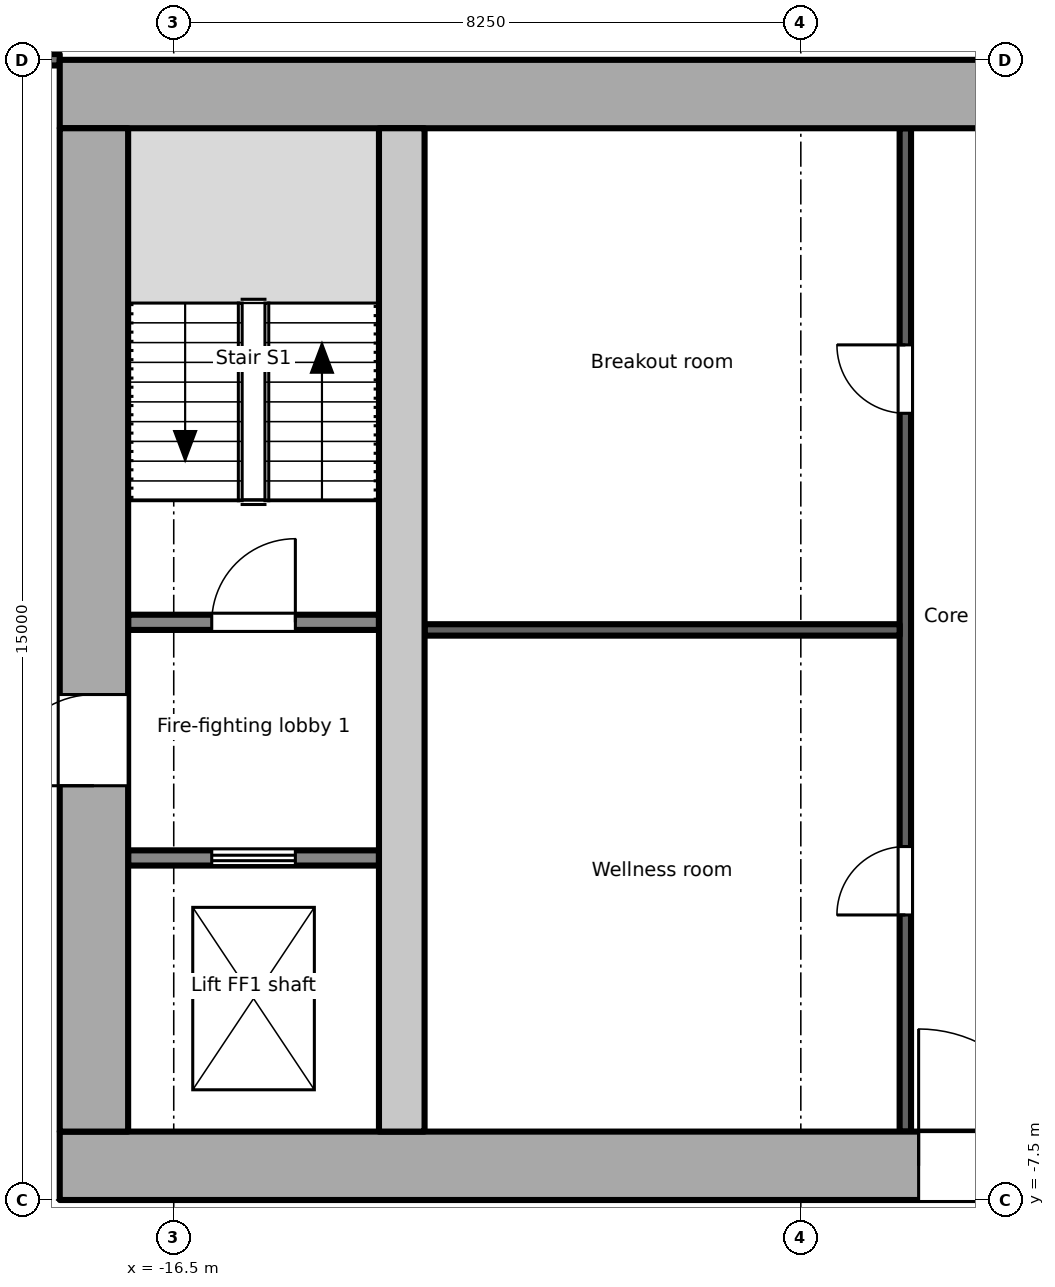
"""IFC4 building model, lengths in metres.
Left out: names, types, materials, properties, quantities, classifications, styles, units other than length and angle.
Written with IfcOpenShell. Run it as: python <this file> out.ifc"""

import sys

from ifc_helpers import new_model, si_unit, direction, frame, frame_2d, origin, place, context, subcontext, project, spatial, rectangle, extrude, element, fill, save


model = new_model("IFC4")
c1 = context("Model", 3, precision=1e-05, world=origin(), true_north=direction((0.0, 1.0)))
c2 = subcontext(c1, "Body", "Model", "MODEL_VIEW")
j1 = project(units=[si_unit("LENGTHUNIT", "METRE"), si_unit("PLANEANGLEUNIT", "RADIAN")], contexts=[c1])
p1 = place(None, origin())
s1 = spatial("IfcSite", under=j1, at=p1, CompositionType="ELEMENT")
p2 = place(p1, origin())
s2 = spatial("IfcBuilding", under=s1, at=p2, CompositionType="ELEMENT")
p3 = place(p2, frame((0.0, 0.0, 266.8)))
s3 = spatial("IfcBuildingStorey", under=s2, at=p3, CompositionType="ELEMENT", Elevation=266.8)
p4 = place(p3, frame((-18.0, -7.05, -0.2), z_axis=(0.0, 0.0, 1.0), x_axis=(1.0, 0.0, 0.0)))
e1 = element("IfcWall", 1, at=p4, inside=s3, PredefinedType="SHEAR", context=c2, shape_type="SweptSolid", body=[
    extrude(rectangle(XDim=36.0, YDim=0.9, at=frame_2d((18.0, 0.0))), origin(), (0.0, 0.0, 1.0), 3.9),
])
p5 = place(p4, frame((11.3, 0.0, 0.2)))
e2 = element("IfcOpeningElement", 2, at=p5, cuts=e1, PredefinedType="OPENING", context=c2, shape_type="SweptSolid", body=[
    extrude(rectangle(XDim=1.8, YDim=2.1, at=frame_2d((0.9, 1.05))), frame((0.0, 0.46, 0.0), z_axis=(0.0, -1.0, 0.0), x_axis=(1.0, 0.0, 0.0)), (0.0, 0.0, 1.0), 0.921),
])
p6 = place(p4, frame((16.8, 0.0, 0.2)))
e3 = element("IfcOpeningElement", 3, at=p6, cuts=e1, PredefinedType="OPENING", context=c2, shape_type="SweptSolid", body=[
    extrude(rectangle(XDim=2.4, YDim=2.1, at=frame_2d((1.2, 1.05))), frame((0.0, 0.46, 0.0), z_axis=(0.0, -1.0, 0.0), x_axis=(1.0, 0.0, 0.0)), (0.0, 0.0, 1.0), 0.921),
])
p7 = place(p4, frame((26.1, 0.0, 0.2)))
e4 = element("IfcOpeningElement", 4, at=p7, cuts=e1, PredefinedType="OPENING", context=c2, shape_type="SweptSolid", body=[
    extrude(rectangle(XDim=2.4, YDim=2.1, at=frame_2d((1.2, 1.05))), frame((0.0, 0.46, 0.0), z_axis=(0.0, -1.0, 0.0), x_axis=(1.0, 0.0, 0.0)), (0.0, 0.0, 1.0), 0.921),
])
p8 = place(p3, frame((-18.0, 7.05, -0.2), z_axis=(0.0, 0.0, 1.0), x_axis=(1.0, 0.0, 0.0)))
e5 = element("IfcWall", 5, at=p8, inside=s3, PredefinedType="SHEAR", context=c2, shape_type="SweptSolid", body=[
    extrude(rectangle(XDim=36.0, YDim=0.9, at=frame_2d((18.0, 0.0))), origin(), (0.0, 0.0, 1.0), 3.9),
])
p9 = place(p3, frame((-17.55, -6.6, -0.2), z_axis=(0.0, 0.0, 1.0), x_axis=(0.0, 1.0, 0.0)))
e6 = element("IfcWall", 6, at=p9, inside=s3, PredefinedType="SHEAR", context=c2, shape_type="SweptSolid", body=[
    extrude(rectangle(XDim=13.2, YDim=0.9, at=frame_2d((6.6, 0.0))), origin(), (0.0, 0.0, 1.0), 3.9),
])
p10 = place(p9, frame((4.55, 0.0, 0.2)))
e7 = element("IfcOpeningElement", 7, at=p10, cuts=e6, PredefinedType="OPENING", context=c2, shape_type="SweptSolid", body=[
    extrude(rectangle(XDim=1.2, YDim=2.1, at=frame_2d((0.6, 1.05))), frame((0.0, 0.46, 0.0), z_axis=(0.0, -1.0, 0.0), x_axis=(1.0, 0.0, 0.0)), (0.0, 0.0, 1.0), 0.921),
])
p11 = place(p3, frame((-13.5, -6.6, -0.2), z_axis=(0.0, 0.0, 1.0), x_axis=(0.0, 1.0, 0.0)))
e8 = element("IfcWall", 8, at=p11, inside=s3, PredefinedType="SHEAR", context=c2, shape_type="SweptSolid", body=[
    extrude(rectangle(XDim=13.2, YDim=0.6, at=frame_2d((6.6, 0.0))), origin(), (0.0, 0.0, 1.0), 3.9),
])
p12 = place(p3, frame((-17.1, -3.0, 0.0), z_axis=(0.0, 0.0, 1.0), x_axis=(1.0, 0.0, 0.0)))
e9 = element("IfcWall", 9, at=p12, inside=s3, PredefinedType="PARTITIONING", context=c2, shape_type="SweptSolid", body=[
    extrude(rectangle(XDim=3.3, YDim=0.2, at=frame_2d((1.65, 0.0))), origin(), (0.0, 0.0, 1.0), 3.7),
])
p13 = place(p12, frame((1.1, 0.0, 0.0)))
e10 = element("IfcOpeningElement", 10, at=p13, cuts=e9, PredefinedType="OPENING", context=c2, shape_type="SweptSolid", body=[
    extrude(rectangle(XDim=1.1, YDim=2.1, at=frame_2d((0.55, 1.05))), frame((0.0, 0.111, 0.0), z_axis=(0.0, -1.0, 0.0), x_axis=(1.0, 0.0, 0.0)), (0.0, 0.0, 1.0), 0.221),
])
p14 = place(p3, frame((-17.1, 0.1, 0.0), z_axis=(0.0, 0.0, 1.0), x_axis=(1.0, 0.0, 0.0)))
e11 = element("IfcWall", 11, at=p14, inside=s3, PredefinedType="PARTITIONING", context=c2, shape_type="SweptSolid", body=[
    extrude(rectangle(XDim=3.3, YDim=0.2, at=frame_2d((1.65, 0.0))), origin(), (0.0, 0.0, 1.0), 3.7),
])
p15 = place(p14, frame((1.1, 0.0, 0.0)))
e12 = element("IfcOpeningElement", 12, at=p15, cuts=e11, PredefinedType="OPENING", context=c2, shape_type="SweptSolid", body=[
    extrude(rectangle(XDim=1.1, YDim=2.1, at=frame_2d((0.55, 1.05))), frame((0.0, 0.111, 0.0), z_axis=(0.0, -1.0, 0.0), x_axis=(1.0, 0.0, 0.0)), (0.0, 0.0, 1.0), 0.221),
])
p16 = place(p3, frame((-6.875, -6.6, 0.0), z_axis=(0.0, 0.0, 1.0), x_axis=(0.0, 1.0, 0.0)))
e13 = element("IfcWall", 13, at=p16, inside=s3, PredefinedType="PARTITIONING", context=c2, shape_type="SweptSolid", body=[
    extrude(rectangle(XDim=13.2, YDim=0.15, at=frame_2d((6.6, 0.0))), origin(), (0.0, 0.0, 1.0), 3.7),
])
p17 = place(p16, frame((2.85, 0.0, 0.0)))
e14 = element("IfcOpeningElement", 14, at=p17, cuts=e13, PredefinedType="OPENING", context=c2, shape_type="SweptSolid", body=[
    extrude(rectangle(XDim=0.9, YDim=2.1, at=frame_2d((0.45, 1.05))), frame((0.0, 0.085, 0.0), z_axis=(0.0, -1.0, 0.0), x_axis=(1.0, 0.0, 0.0)), (0.0, 0.0, 1.0), 0.171),
])
p18 = place(p16, frame((9.45, 0.0, 0.0)))
e15 = element("IfcOpeningElement", 15, at=p18, cuts=e13, PredefinedType="OPENING", context=c2, shape_type="SweptSolid", body=[
    extrude(rectangle(XDim=0.9, YDim=2.1, at=frame_2d((0.45, 1.05))), frame((0.0, 0.085, 0.0), z_axis=(0.0, -1.0, 0.0), x_axis=(1.0, 0.0, 0.0)), (0.0, 0.0, 1.0), 0.171),
])
p19 = place(p3, frame((-13.2, 0.0, 0.0), z_axis=(0.0, 0.0, 1.0), x_axis=(1.0, 0.0, 0.0)))
e16 = element("IfcWall", 16, at=p19, inside=s3, PredefinedType="PARTITIONING", context=c2, shape_type="SweptSolid", body=[
    extrude(rectangle(XDim=6.25, YDim=0.15, at=frame_2d((3.125, 0.0))), origin(), (0.0, 0.0, 1.0), 3.7),
])
p20 = place(p3, frame((-20.625, 7.501, 0.0), z_axis=(0.0, 0.0, 1.0), x_axis=(1.0, 0.0, 0.0)))
e17 = element("IfcWall", 17, at=p20, inside=s3, PredefinedType="PARTITIONING", context=c2, shape_type="SweptSolid", body=[
    extrude(rectangle(XDim=2.625, YDim=0.15, at=frame_2d((1.312, 0.0))), origin(), (0.0, 0.0, 1.0), 3.7),
])
p21 = place(p13, origin())
e18 = element("IfcDoor", 18, at=p21, inside=s3, OperationType="DOUBLE_DOOR_SLIDING", PredefinedType="DOOR", context=c2, shape_type="SweptSolid", body=[
    extrude(rectangle(XDim=1.1, YDim=2.1, at=frame_2d((0.55, 1.05))), frame((0.0, 0.025, 0.0), z_axis=(0.0, -1.0, 0.0), x_axis=(1.0, 0.0, 0.0)), (0.0, 0.0, 1.0), 0.05),
])
fill(e10, e18)
p22 = place(p10, origin())
e19 = element("IfcDoor", 19, at=p22, inside=s3, OperationType="SINGLE_SWING_LEFT", PredefinedType="DOOR", context=c2, shape_type="SweptSolid", body=[
    extrude(rectangle(XDim=1.2, YDim=2.1, at=frame_2d((0.6, 1.05))), frame((0.0, 0.025, 0.0), z_axis=(0.0, -1.0, 0.0), x_axis=(1.0, 0.0, 0.0)), (0.0, 0.0, 1.0), 0.05),
])
fill(e7, e19)
p23 = place(p15, origin())
e20 = element("IfcDoor", 20, at=p23, inside=s3, OperationType="SINGLE_SWING_RIGHT", PredefinedType="DOOR", context=c2, shape_type="SweptSolid", body=[
    extrude(rectangle(XDim=1.1, YDim=2.1, at=frame_2d((0.55, 1.05))), frame((0.0, 0.025, 0.0), z_axis=(0.0, -1.0, 0.0), x_axis=(1.0, 0.0, 0.0)), (0.0, 0.0, 1.0), 0.05),
])
fill(e12, e20)
p24 = place(p17, origin())
e21 = element("IfcDoor", 21, at=p24, inside=s3, OperationType="SINGLE_SWING_LEFT", PredefinedType="DOOR", context=c2, shape_type="SweptSolid", body=[
    extrude(rectangle(XDim=0.9, YDim=2.1, at=frame_2d((0.45, 1.05))), frame((0.0, 0.025, 0.0), z_axis=(0.0, -1.0, 0.0), x_axis=(1.0, 0.0, 0.0)), (0.0, 0.0, 1.0), 0.05),
])
fill(e14, e21)
p25 = place(p18, origin())
e22 = element("IfcDoor", 22, at=p25, inside=s3, OperationType="SINGLE_SWING_RIGHT", PredefinedType="DOOR", context=c2, shape_type="SweptSolid", body=[
    extrude(rectangle(XDim=0.9, YDim=2.1, at=frame_2d((0.45, 1.05))), frame((0.0, 0.025, 0.0), z_axis=(0.0, -1.0, 0.0), x_axis=(1.0, 0.0, 0.0)), (0.0, 0.0, 1.0), 0.05),
])
fill(e15, e22)
p26 = place(p5, origin())
e23 = element("IfcDoor", 23, at=p26, inside=s3, OperationType="SINGLE_SWING_LEFT", PredefinedType="DOOR", context=c2, shape_type="SweptSolid", body=[
    extrude(rectangle(XDim=1.8, YDim=2.1, at=frame_2d((0.9, 1.05))), frame((0.0, 0.025, 0.0), z_axis=(0.0, -1.0, 0.0), x_axis=(1.0, 0.0, 0.0)), (0.0, 0.0, 1.0), 0.05),
])
fill(e2, e23)
save(model, sys.argv[1])
